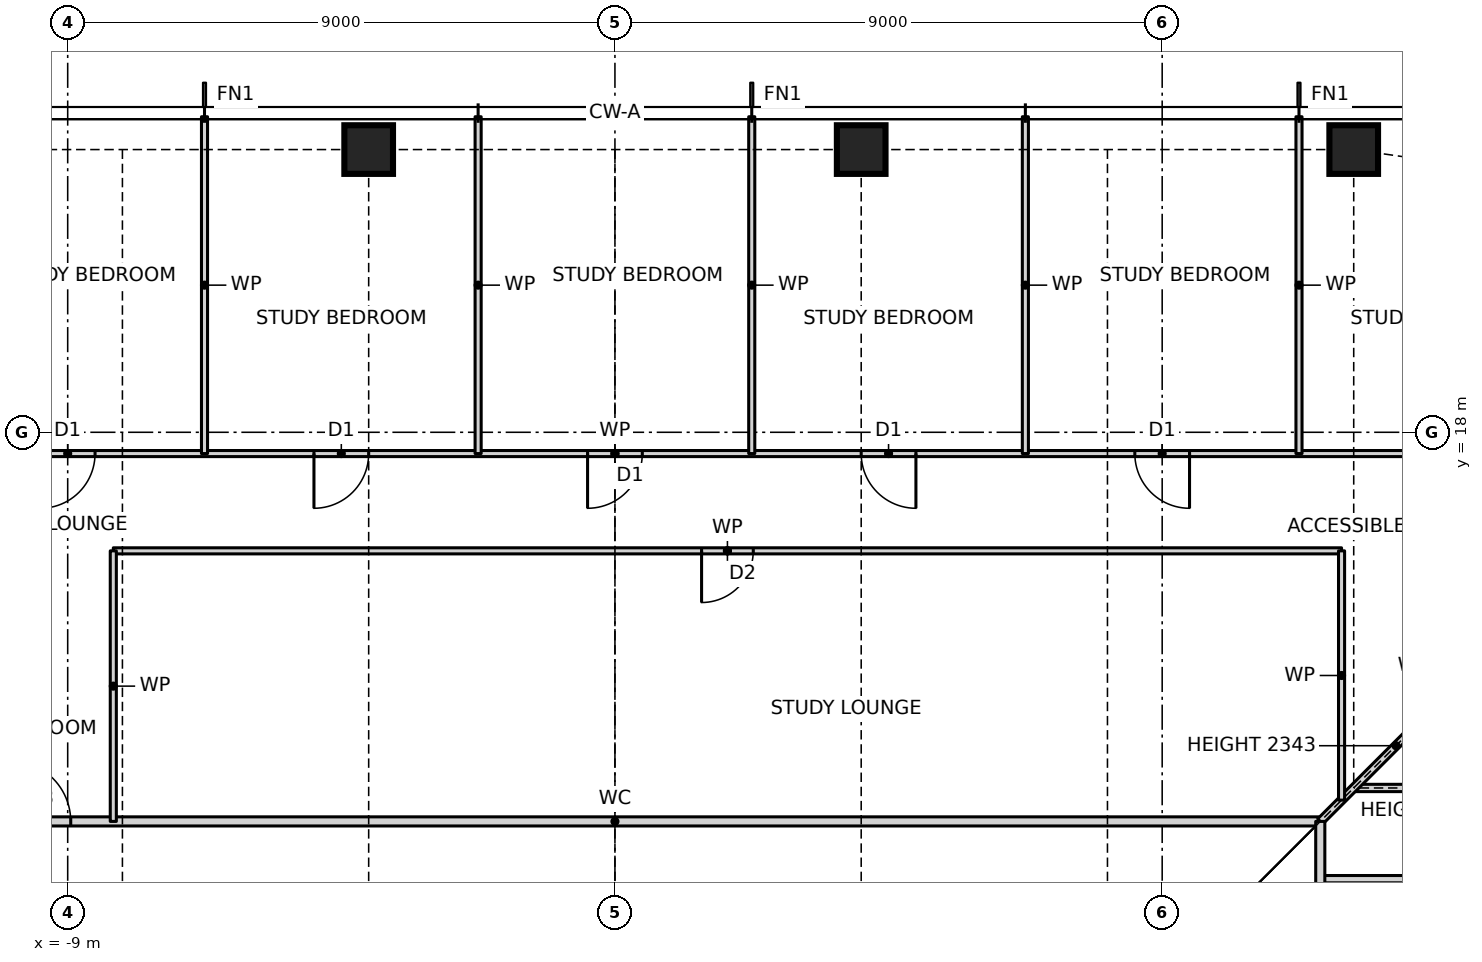
"""IFC4 building model, lengths in metres.
Left out: names, types, materials, properties, quantities, classifications, styles, units other than length and angle.
Written with IfcOpenShell. Run it as: python <this file> out.ifc"""

import sys

from ifc_helpers import new_model, si_unit, direction, frame, frame_2d, origin, origin_2d, place, context, subcontext, project, spatial, rectangle, hollow_rectangle, extrude, element, fill, save


model = new_model("IFC4")
c1 = context("Model", 3, precision=1e-05, world=origin(), true_north=direction((0.0, 1.0)))
c2 = subcontext(c1, "Body", "Model", "MODEL_VIEW")
j1 = project(units=[si_unit("LENGTHUNIT", "METRE"), si_unit("PLANEANGLEUNIT", "RADIAN")], contexts=[c1])
p1 = place(None, origin())
s1 = spatial("IfcSite", under=j1, at=p1, CompositionType="ELEMENT")
p2 = place(p1, origin())
s2 = spatial("IfcBuilding", under=s1, at=p2, CompositionType="ELEMENT")
p3 = place(p2, frame((0.0, 0.0, 15.0)))
s3 = spatial("IfcBuildingStorey", under=s2, at=p3, CompositionType="ELEMENT", Elevation=15.0)
for number, where, z_axis, x_axis in (
    (1, (12.15, 22.65, 0.0), (0.0, 0.0, 1.0), (1.0, 0.0, 0.0)),
    (2, (4.05, 22.65, 0.0), (0.0, 0.0, 1.0), (1.0, 0.0, 0.0)),
    (3, (-4.05, 22.65, 0.0), (0.0, 0.0, 1.0), (1.0, 0.0, 0.0)),
):
    element("IfcColumn", number, at=place(p3, frame(where, z_axis=z_axis, x_axis=x_axis)), inside=s3, PredefinedType="COLUMN", context=c2, shape_type="SweptSolid", body=[
        extrude(hollow_rectangle(XDim=0.8, YDim=0.8, WallThickness=0.09, at=origin_2d()), origin(), (0.0, 0.0, 1.0), 3.5),
    ])
p4 = place(p3, frame((11.6, 10.65, 0.0), z_axis=(0.0, 0.0, 1.0), x_axis=(1.0, 0.0, 0.0)))
e4 = element("IfcWall", 4, at=p4, inside=s3, PredefinedType="PARTITIONING", context=c2, shape_type="SweptSolid", body=[
    extrude(rectangle(XDim=4.45, YDim=0.12, at=frame_2d((2.225, 0.0))), origin(), (0.0, 0.0, 1.0), 3.27),
])
p5 = place(p4, frame((1.8, 0.0, 0.0)))
e5 = element("IfcOpeningElement", 5, at=p5, cuts=e4, PredefinedType="OPENING", context=c2, shape_type="SweptSolid", body=[
    extrude(rectangle(XDim=0.85, YDim=2.1, at=frame_2d((0.425, 1.05))), frame((0.0, 0.07, 0.0), z_axis=(0.0, -1.0, 0.0), x_axis=(1.0, 0.0, 0.0)), (0.0, 0.0, 1.0), 0.14),
])
p6 = place(p3, frame((-11.6, 11.6, 0.0), z_axis=(0.0, 0.0, 1.0), x_axis=(1.0, 0.0, 0.0)))
e6 = element("IfcWall", 6, at=p6, inside=s3, PredefinedType="PARTITIONING", context=c2, shape_type="SweptSolid", body=[
    extrude(rectangle(XDim=23.2, YDim=0.15, at=frame_2d((11.6, 0.0))), origin(), (0.0, 0.0, 1.0), 3.27),
])
p7 = place(p6, frame((1.65, 0.0, 0.0)))
e7 = element("IfcOpeningElement", 7, at=p7, cuts=e6, PredefinedType="OPENING", context=c2, shape_type="SweptSolid", body=[
    extrude(rectangle(XDim=1.0, YDim=2.1, at=frame_2d((0.5, 1.05))), frame((0.0, 0.085, 0.0), z_axis=(0.0, -1.0, 0.0), x_axis=(1.0, 0.0, 0.0)), (0.0, 0.0, 1.0), 0.17),
])
p8 = place(p3, frame((12.15, 12.15, 0.0), z_axis=(0.0, 0.0, 1.0), x_axis=(1.0, 0.0, 0.0)))
e8 = element("IfcWall", 8, at=p8, inside=s3, PredefinedType="PARTITIONING", context=c2, shape_type="SweptSolid", body=[
    extrude(rectangle(XDim=3.9, YDim=0.12, at=frame_2d((1.95, 0.0))), origin(), (0.0, 0.0, 1.0), 2.508),
])
p9 = place(p3, frame((-8.25, 16.05, 0.0), z_axis=(0.0, 0.0, 1.0), x_axis=(1.0, 0.0, 0.0)))
e9 = element("IfcWall", 9, at=p9, inside=s3, PredefinedType="PARTITIONING", context=c2, shape_type="SweptSolid", body=[
    extrude(rectangle(XDim=20.2, YDim=0.1, at=frame_2d((10.1, 0.0))), origin(), (0.0, 0.0, 1.0), 3.27),
])
p10 = place(p9, frame((9.675, 0.0, 0.0)))
e10 = element("IfcOpeningElement", 10, at=p10, cuts=e9, PredefinedType="OPENING", context=c2, shape_type="SweptSolid", body=[
    extrude(rectangle(XDim=0.85, YDim=2.1, at=frame_2d((0.425, 1.05))), frame((0.0, 0.06, 0.0), z_axis=(0.0, -1.0, 0.0), x_axis=(1.0, 0.0, 0.0)), (0.0, 0.0, 1.0), 0.12),
])
p11 = place(p3, frame((-15.75, 17.65, 0.0), z_axis=(0.0, 0.0, 1.0), x_axis=(1.0, 0.0, 0.0)))
e11 = element("IfcWall", 11, at=p11, inside=s3, PredefinedType="PARTITIONING", context=c2, shape_type="SweptSolid", body=[
    extrude(rectangle(XDim=31.5, YDim=0.1, at=frame_2d((15.75, 0.0))), origin(), (0.0, 0.0, 1.0), 3.27),
])
p12 = place(p11, frame((28.8, 0.0, 0.0)))
e12 = element("IfcOpeningElement", 12, at=p12, cuts=e11, PredefinedType="OPENING", context=c2, shape_type="SweptSolid", body=[
    extrude(rectangle(XDim=0.9, YDim=2.1, at=frame_2d((0.45, 1.05))), frame((0.0, 0.06, 0.0), z_axis=(0.0, -1.0, 0.0), x_axis=(1.0, 0.0, 0.0)), (0.0, 0.0, 1.0), 0.12),
])
p13 = place(p11, frame((24.3, 0.0, 0.0)))
e13 = element("IfcOpeningElement", 13, at=p13, cuts=e11, PredefinedType="OPENING", context=c2, shape_type="SweptSolid", body=[
    extrude(rectangle(XDim=0.9, YDim=2.1, at=frame_2d((0.45, 1.05))), frame((0.0, 0.06, 0.0), z_axis=(0.0, -1.0, 0.0), x_axis=(1.0, 0.0, 0.0)), (0.0, 0.0, 1.0), 0.12),
])
p14 = place(p11, frame((19.8, 0.0, 0.0)))
e14 = element("IfcOpeningElement", 14, at=p14, cuts=e11, PredefinedType="OPENING", context=c2, shape_type="SweptSolid", body=[
    extrude(rectangle(XDim=0.9, YDim=2.1, at=frame_2d((0.45, 1.05))), frame((0.0, 0.06, 0.0), z_axis=(0.0, -1.0, 0.0), x_axis=(1.0, 0.0, 0.0)), (0.0, 0.0, 1.0), 0.12),
])
p15 = place(p11, frame((15.3, 0.0, 0.0)))
e15 = element("IfcOpeningElement", 15, at=p15, cuts=e11, PredefinedType="OPENING", context=c2, shape_type="SweptSolid", body=[
    extrude(rectangle(XDim=0.9, YDim=2.1, at=frame_2d((0.45, 1.05))), frame((0.0, 0.06, 0.0), z_axis=(0.0, -1.0, 0.0), x_axis=(1.0, 0.0, 0.0)), (0.0, 0.0, 1.0), 0.12),
])
p16 = place(p11, frame((10.8, 0.0, 0.0)))
e16 = element("IfcOpeningElement", 16, at=p16, cuts=e11, PredefinedType="OPENING", context=c2, shape_type="SweptSolid", body=[
    extrude(rectangle(XDim=0.9, YDim=2.1, at=frame_2d((0.45, 1.05))), frame((0.0, 0.06, 0.0), z_axis=(0.0, -1.0, 0.0), x_axis=(1.0, 0.0, 0.0)), (0.0, 0.0, 1.0), 0.12),
])
p17 = place(p11, frame((6.3, 0.0, 0.0)))
e17 = element("IfcOpeningElement", 17, at=p17, cuts=e11, PredefinedType="OPENING", context=c2, shape_type="SweptSolid", body=[
    extrude(rectangle(XDim=0.9, YDim=2.1, at=frame_2d((0.45, 1.05))), frame((0.0, 0.06, 0.0), z_axis=(0.0, -1.0, 0.0), x_axis=(1.0, 0.0, 0.0)), (0.0, 0.0, 1.0), 0.12),
])
p18 = place(p11, frame((1.8, 0.0, 0.0)))
e18 = element("IfcOpeningElement", 18, at=p18, cuts=e11, PredefinedType="OPENING", context=c2, shape_type="SweptSolid", body=[
    extrude(rectangle(XDim=0.9, YDim=2.1, at=frame_2d((0.45, 1.05))), frame((0.0, 0.06, 0.0), z_axis=(0.0, -1.0, 0.0), x_axis=(1.0, 0.0, 0.0)), (0.0, 0.0, 1.0), 0.12),
])
p19 = place(p3, frame((11.6, 11.6, 0.0), z_axis=(0.0, 0.0, 1.0), x_axis=(0.707106781187, 0.707106781187, 0.0)))
e19 = element("IfcWall", 19, at=p19, inside=s3, PredefinedType="PARTITIONING", context=c2, shape_type="SweptSolid", body=[
    extrude(rectangle(XDim=5.869, YDim=0.12, at=frame_2d((2.935, 0.0))), origin(), (0.0, 0.0, 1.0), 2.343),
])
p20 = place(p3, frame((11.95, 11.95, 0.0), z_axis=(0.0, 0.0, 1.0), x_axis=(0.0, 1.0, 0.0)))
e20 = element("IfcWall", 20, at=p20, inside=s3, PredefinedType="PARTITIONING", context=c2, shape_type="SweptSolid", body=[
    extrude(rectangle(XDim=4.1, YDim=0.1, at=frame_2d((2.05, 0.0))), origin(), (0.0, 0.0, 1.0), 3.27),
])
p21 = place(p3, frame((11.6, -12.6, 0.0), z_axis=(0.0, 0.0, 1.0), x_axis=(0.0, 1.0, 0.0)))
e21 = element("IfcWall", 21, at=p21, inside=s3, PredefinedType="PARTITIONING", context=c2, shape_type="SweptSolid", body=[
    extrude(rectangle(XDim=24.2, YDim=0.15, at=frame_2d((12.1, 0.0))), origin(), (0.0, 0.0, 1.0), 3.27),
])
p22 = place(p21, frame((21.55, 0.0, 0.0)))
e22 = element("IfcOpeningElement", 22, at=p22, cuts=e21, PredefinedType="OPENING", context=c2, shape_type="SweptSolid", body=[
    extrude(rectangle(XDim=1.0, YDim=2.1, at=frame_2d((0.5, 1.05))), frame((0.0, 0.085, 0.0), z_axis=(0.0, -1.0, 0.0), x_axis=(1.0, 0.0, 0.0)), (0.0, 0.0, 1.0), 0.17),
])
for number, where, z_axis, x_axis in (
    (23, (11.25, 17.65, 0.0), (0.0, 0.0, 1.0), (0.0, 1.0, 0.0)),
    (24, (6.75, 17.65, 0.0), (0.0, 0.0, 1.0), (0.0, 1.0, 0.0)),
    (25, (2.25, 17.65, 0.0), (0.0, 0.0, 1.0), (0.0, 1.0, 0.0)),
    (26, (-2.25, 17.65, 0.0), (0.0, 0.0, 1.0), (0.0, 1.0, 0.0)),
    (27, (-6.75, 17.65, 0.0), (0.0, 0.0, 1.0), (0.0, 1.0, 0.0)),
):
    element("IfcWall", number, at=place(p3, frame(where, z_axis=z_axis, x_axis=x_axis)), inside=s3, PredefinedType="PARTITIONING", context=c2, shape_type="SweptSolid", body=[
        extrude(rectangle(XDim=5.54, YDim=0.1, at=frame_2d((2.77, 0.0))), origin(), (0.0, 0.0, 1.0), 3.27),
    ])
p23 = place(p3, frame((-8.25, 11.6, 0.0), z_axis=(0.0, 0.0, 1.0), x_axis=(0.0, 1.0, 0.0)))
e28 = element("IfcWall", 28, at=p23, inside=s3, PredefinedType="PARTITIONING", context=c2, shape_type="SweptSolid", body=[
    extrude(rectangle(XDim=4.45, YDim=0.1, at=frame_2d((2.225, 0.0))), origin(), (0.0, 0.0, 1.0), 3.27),
])
p24 = place(p13, frame((0.9, 0.0, 0.0), z_axis=(0.0, 0.0, 1.0), x_axis=(-1.0, 0.0, 0.0)))
e29 = element("IfcDoor", 29, at=p24, inside=s3, OperationType="SINGLE_SWING_LEFT", PredefinedType="DOOR", context=c2, shape_type="SweptSolid", body=[
    extrude(rectangle(XDim=0.9, YDim=2.1, at=frame_2d((0.45, 1.05))), frame((0.0, 0.025, 0.0), z_axis=(0.0, -1.0, 0.0), x_axis=(1.0, 0.0, 0.0)), (0.0, 0.0, 1.0), 0.05),
])
fill(e13, e29)
p25 = place(p14, frame((0.9, 0.0, 0.0), z_axis=(0.0, 0.0, 1.0), x_axis=(-1.0, 0.0, 0.0)))
e30 = element("IfcDoor", 30, at=p25, inside=s3, OperationType="SINGLE_SWING_LEFT", PredefinedType="DOOR", context=c2, shape_type="SweptSolid", body=[
    extrude(rectangle(XDim=0.9, YDim=2.1, at=frame_2d((0.45, 1.05))), frame((0.0, 0.025, 0.0), z_axis=(0.0, -1.0, 0.0), x_axis=(1.0, 0.0, 0.0)), (0.0, 0.0, 1.0), 0.05),
])
fill(e14, e30)
p26 = place(p15, frame((0.9, 0.0, 0.0), z_axis=(0.0, 0.0, 1.0), x_axis=(-1.0, 0.0, 0.0)))
e31 = element("IfcDoor", 31, at=p26, inside=s3, OperationType="SINGLE_SWING_RIGHT", PredefinedType="DOOR", context=c2, shape_type="SweptSolid", body=[
    extrude(rectangle(XDim=0.9, YDim=2.1, at=frame_2d((0.45, 1.05))), frame((0.0, 0.025, 0.0), z_axis=(0.0, -1.0, 0.0), x_axis=(1.0, 0.0, 0.0)), (0.0, 0.0, 1.0), 0.05),
])
fill(e15, e31)
p27 = place(p16, frame((0.9, 0.0, 0.0), z_axis=(0.0, 0.0, 1.0), x_axis=(-1.0, 0.0, 0.0)))
e32 = element("IfcDoor", 32, at=p27, inside=s3, OperationType="SINGLE_SWING_RIGHT", PredefinedType="DOOR", context=c2, shape_type="SweptSolid", body=[
    extrude(rectangle(XDim=0.9, YDim=2.1, at=frame_2d((0.45, 1.05))), frame((0.0, 0.025, 0.0), z_axis=(0.0, -1.0, 0.0), x_axis=(1.0, 0.0, 0.0)), (0.0, 0.0, 1.0), 0.05),
])
fill(e16, e32)
p28 = place(p17, frame((0.9, 0.0, 0.0), z_axis=(0.0, 0.0, 1.0), x_axis=(-1.0, 0.0, 0.0)))
e33 = element("IfcDoor", 33, at=p28, inside=s3, OperationType="SINGLE_SWING_RIGHT", PredefinedType="DOOR", context=c2, shape_type="SweptSolid", body=[
    extrude(rectangle(XDim=0.9, YDim=2.1, at=frame_2d((0.45, 1.05))), frame((0.0, 0.025, 0.0), z_axis=(0.0, -1.0, 0.0), x_axis=(1.0, 0.0, 0.0)), (0.0, 0.0, 1.0), 0.05),
])
fill(e17, e33)
p29 = place(p7, origin())
e34 = element("IfcDoor", 34, at=p29, inside=s3, OperationType="SINGLE_SWING_LEFT", PredefinedType="DOOR", context=c2, shape_type="SweptSolid", body=[
    extrude(rectangle(XDim=1.0, YDim=2.1, at=frame_2d((0.5, 1.05))), frame((0.0, 0.025, 0.0), z_axis=(0.0, -1.0, 0.0), x_axis=(1.0, 0.0, 0.0)), (0.0, 0.0, 1.0), 0.05),
])
fill(e7, e34)
p30 = place(p10, frame((0.85, 0.0, 0.0), z_axis=(0.0, 0.0, 1.0), x_axis=(-1.0, 0.0, 0.0)))
e35 = element("IfcDoor", 35, at=p30, inside=s3, OperationType="SINGLE_SWING_RIGHT", PredefinedType="DOOR", context=c2, shape_type="SweptSolid", body=[
    extrude(rectangle(XDim=0.85, YDim=2.1, at=frame_2d((0.425, 1.05))), frame((0.0, 0.025, 0.0), z_axis=(0.0, -1.0, 0.0), x_axis=(1.0, 0.0, 0.0)), (0.0, 0.0, 1.0), 0.05),
])
fill(e10, e35)
save(model, sys.argv[1])
